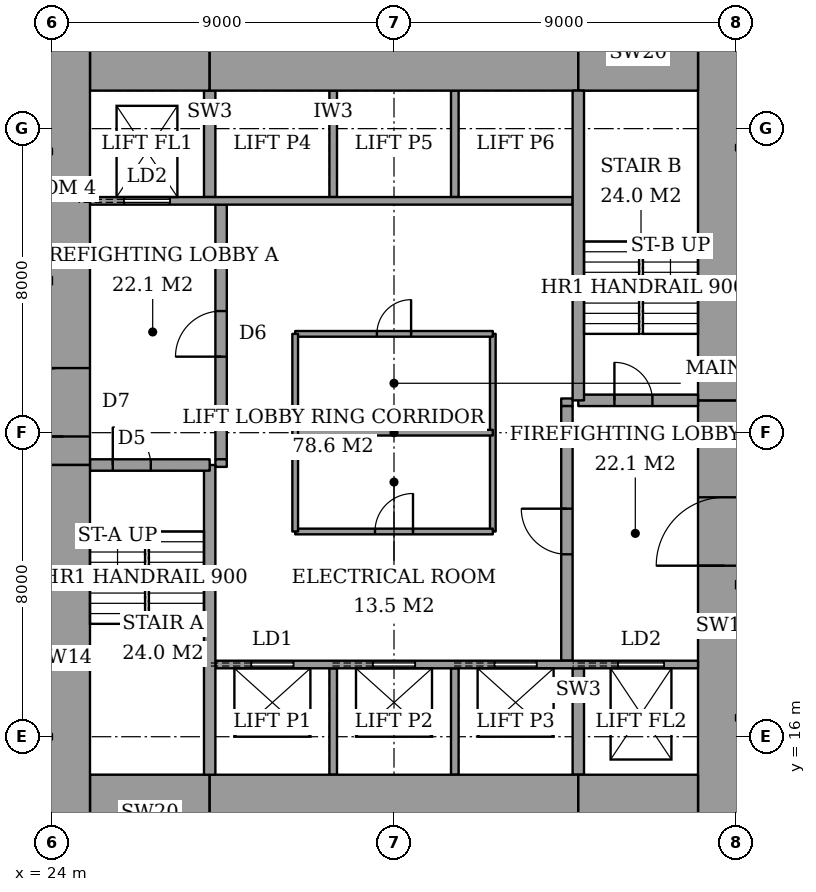
"""IFC4 building model, lengths in metres.
Left out: names, types, materials, properties, quantities, classifications, styles, units other than length and angle.
Written with IfcOpenShell. Run it as: python <this file> out.ifc"""

import sys

from ifc_helpers import new_model, si_unit, direction, frame, frame_2d, origin, place, context, subcontext, project, spatial, rectangle, extrude, element, fill, save


model = new_model("IFC4")
c1 = context("Model", 3, precision=1e-05, world=origin(), true_north=direction((0.0, 1.0)))
c2 = subcontext(c1, "Body", "Model", "MODEL_VIEW")
j1 = project(units=[si_unit("LENGTHUNIT", "METRE"), si_unit("PLANEANGLEUNIT", "RADIAN")], contexts=[c1])
p1 = place(None, origin())
s1 = spatial("IfcSite", under=j1, at=p1, CompositionType="ELEMENT")
p2 = place(p1, origin())
s2 = spatial("IfcBuilding", under=s1, at=p2, CompositionType="ELEMENT")
p3 = place(p2, frame((0.0, 0.0, 117.8)))
s3 = spatial("IfcBuildingStorey", under=s2, at=p3, CompositionType="ELEMENT", Elevation=117.8)
p4 = place(p3, frame((25.0, 14.0, 0.0), z_axis=(0.0, 0.0, 1.0), x_axis=(1.0, 0.0, 0.0)))
e1 = element("IfcWall", 1, at=p4, inside=s3, PredefinedType="SHEAR", context=c2, shape_type="SweptSolid", body=[
    extrude(rectangle(XDim=3.15, YDim=2.0, at=frame_2d((1.575, 0.0))), origin(), (0.0, 0.0, 1.0), 3.6),
])
p5 = place(p3, frame((28.15, 14.0, 0.0), z_axis=(0.0, 0.0, 1.0), x_axis=(1.0, 0.0, 0.0)))
e2 = element("IfcWall", 2, at=p5, inside=s3, PredefinedType="SHEAR", context=c2, shape_type="SweptSolid", body=[
    extrude(rectangle(XDim=9.7, YDim=2.0, at=frame_2d((4.85, 0.0))), origin(), (0.0, 0.0, 1.0), 3.6),
])
for number, where, z_axis, x_axis in (
    (3, (37.85, 14.0, 0.0), (0.0, 0.0, 1.0), (1.0, 0.0, 0.0)),
    (4, (25.0, 34.0, 0.0), (0.0, 0.0, 1.0), (1.0, 0.0, 0.0)),
):
    element("IfcWall", number, at=place(p3, frame(where, z_axis=z_axis, x_axis=x_axis)), inside=s3, PredefinedType="SHEAR", context=c2, shape_type="SweptSolid", body=[
        extrude(rectangle(XDim=3.15, YDim=2.0, at=frame_2d((1.575, 0.0))), origin(), (0.0, 0.0, 1.0), 3.6),
    ])
p6 = place(p3, frame((28.15, 34.0, 0.0), z_axis=(0.0, 0.0, 1.0), x_axis=(1.0, 0.0, 0.0)))
e5 = element("IfcWall", 5, at=p6, inside=s3, PredefinedType="SHEAR", context=c2, shape_type="SweptSolid", body=[
    extrude(rectangle(XDim=9.7, YDim=2.0, at=frame_2d((4.85, 0.0))), origin(), (0.0, 0.0, 1.0), 3.6),
])
p7 = place(p3, frame((37.85, 34.0, 0.0), z_axis=(0.0, 0.0, 1.0), x_axis=(1.0, 0.0, 0.0)))
e6 = element("IfcWall", 6, at=p7, inside=s3, PredefinedType="SHEAR", context=c2, shape_type="SweptSolid", body=[
    extrude(rectangle(XDim=3.15, YDim=2.0, at=frame_2d((1.575, 0.0))), origin(), (0.0, 0.0, 1.0), 3.6),
])
p8 = place(p3, frame((24.3, 13.0, 0.0), z_axis=(0.0, 0.0, 1.0), x_axis=(0.0, 1.0, 0.0)))
e7 = element("IfcWall", 7, at=p8, inside=s3, PredefinedType="SHEAR", context=c2, shape_type="SweptSolid", body=[
    extrude(rectangle(XDim=10.15, YDim=1.4, at=frame_2d((5.075, 0.0))), origin(), (0.0, 0.0, 1.0), 3.6),
])
p9 = place(p3, frame((24.3, 23.15, 0.0), z_axis=(0.0, 0.0, 1.0), x_axis=(0.0, 1.0, 0.0)))
e8 = element("IfcWall", 8, at=p9, inside=s3, PredefinedType="SHEAR", context=c2, shape_type="SweptSolid", body=[
    extrude(rectangle(XDim=11.85, YDim=1.4, at=frame_2d((5.925, 0.0))), origin(), (0.0, 0.0, 1.0), 3.6),
])
p10 = place(p9, frame((0.75, 0.0, 0.0)))
e9 = element("IfcOpeningElement", 9, at=p10, cuts=e8, PredefinedType="OPENING", context=c2, shape_type="SweptSolid", body=[
    extrude(rectangle(XDim=1.8, YDim=2.4, at=frame_2d((0.9, 1.2))), frame((0.0, 0.71, 0.0), z_axis=(0.0, -1.0, 0.0), x_axis=(1.0, 0.0, 0.0)), (0.0, 0.0, 1.0), 1.42),
])
p11 = place(p3, frame((41.7, 13.0, 0.0), z_axis=(0.0, 0.0, 1.0), x_axis=(0.0, 1.0, 0.0)))
e10 = element("IfcWall", 10, at=p11, inside=s3, PredefinedType="SHEAR", context=c2, shape_type="SweptSolid", body=[
    extrude(rectangle(XDim=11.85, YDim=1.4, at=frame_2d((5.925, 0.0))), origin(), (0.0, 0.0, 1.0), 3.6),
])
p12 = place(p11, frame((7.5, 0.0, 0.0)))
e11 = element("IfcOpeningElement", 11, at=p12, cuts=e10, PredefinedType="OPENING", context=c2, shape_type="SweptSolid", body=[
    extrude(rectangle(XDim=1.8, YDim=2.4, at=frame_2d((0.9, 1.2))), frame((0.0, 0.71, 0.0), z_axis=(0.0, -1.0, 0.0), x_axis=(1.0, 0.0, 0.0)), (0.0, 0.0, 1.0), 1.42),
])
p13 = place(p3, frame((41.7, 24.85, 0.0), z_axis=(0.0, 0.0, 1.0), x_axis=(0.0, 1.0, 0.0)))
e12 = element("IfcWall", 12, at=p13, inside=s3, PredefinedType="SHEAR", context=c2, shape_type="SweptSolid", body=[
    extrude(rectangle(XDim=10.15, YDim=1.4, at=frame_2d((5.075, 0.0))), origin(), (0.0, 0.0, 1.0), 3.6),
])
p14 = place(p3, frame((28.15, 15.0, 0.0), z_axis=(0.0, 0.0, 1.0), x_axis=(0.0, 1.0, 0.0)))
e13 = element("IfcWall", 13, at=p14, inside=s3, PredefinedType="SHEAR", context=c2, shape_type="SweptSolid", body=[
    extrude(rectangle(XDim=8.15, YDim=0.3, at=frame_2d((4.075, 0.0))), origin(), (0.0, 0.0, 1.0), 3.6),
])
p15 = place(p3, frame((25.0, 23.15, 0.0), z_axis=(0.0, 0.0, 1.0), x_axis=(1.0, 0.0, 0.0)))
e14 = element("IfcWall", 14, at=p15, inside=s3, PredefinedType="SHEAR", context=c2, shape_type="SweptSolid", body=[
    extrude(rectangle(XDim=3.15, YDim=0.3, at=frame_2d((1.575, 0.0))), origin(), (0.0, 0.0, 1.0), 3.6),
])
p16 = place(p15, frame((0.6, 0.0, 0.0)))
e15 = element("IfcOpeningElement", 15, at=p16, cuts=e14, PredefinedType="OPENING", context=c2, shape_type="SweptSolid", body=[
    extrude(rectangle(XDim=1.0, YDim=2.1, at=frame_2d((0.5, 1.05))), frame((0.0, 0.16, 0.0), z_axis=(0.0, -1.0, 0.0), x_axis=(1.0, 0.0, 0.0)), (0.0, 0.0, 1.0), 0.32),
])
p17 = place(p3, frame((37.85, 24.85, 0.0), z_axis=(0.0, 0.0, 1.0), x_axis=(0.0, 1.0, 0.0)))
e16 = element("IfcWall", 16, at=p17, inside=s3, PredefinedType="SHEAR", context=c2, shape_type="SweptSolid", body=[
    extrude(rectangle(XDim=8.15, YDim=0.3, at=frame_2d((4.075, 0.0))), origin(), (0.0, 0.0, 1.0), 3.6),
])
p18 = place(p3, frame((37.85, 24.85, 0.0), z_axis=(0.0, 0.0, 1.0), x_axis=(1.0, 0.0, 0.0)))
e17 = element("IfcWall", 17, at=p18, inside=s3, PredefinedType="SHEAR", context=c2, shape_type="SweptSolid", body=[
    extrude(rectangle(XDim=3.15, YDim=0.3, at=frame_2d((1.575, 0.0))), origin(), (0.0, 0.0, 1.0), 3.6),
])
p19 = place(p18, frame((0.95, 0.0, 0.0)))
e18 = element("IfcOpeningElement", 18, at=p19, cuts=e17, PredefinedType="OPENING", context=c2, shape_type="SweptSolid", body=[
    extrude(rectangle(XDim=1.0, YDim=2.1, at=frame_2d((0.5, 1.05))), frame((0.0, 0.16, 0.0), z_axis=(0.0, -1.0, 0.0), x_axis=(1.0, 0.0, 0.0)), (0.0, 0.0, 1.0), 0.32),
])
p20 = place(p3, frame((28.45, 23.3, 0.0), z_axis=(0.0, 0.0, 1.0), x_axis=(0.0, 1.0, 0.0)))
e19 = element("IfcWall", 19, at=p20, inside=s3, PredefinedType="PARTITIONING", context=c2, shape_type="SweptSolid", body=[
    extrude(rectangle(XDim=6.7, YDim=0.3, at=frame_2d((3.35, 0.0))), origin(), (0.0, 0.0, 1.0), 3.6),
])
p21 = place(p20, frame((2.7, 0.0, 0.0)))
e20 = element("IfcOpeningElement", 20, at=p21, cuts=e19, PredefinedType="OPENING", context=c2, shape_type="SweptSolid", body=[
    extrude(rectangle(XDim=1.2, YDim=2.1, at=frame_2d((0.6, 1.05))), frame((0.0, 0.16, 0.0), z_axis=(0.0, -1.0, 0.0), x_axis=(1.0, 0.0, 0.0)), (0.0, 0.0, 1.0), 0.32),
])
p22 = place(p3, frame((37.55, 18.0, 0.0), z_axis=(0.0, 0.0, 1.0), x_axis=(0.0, 1.0, 0.0)))
e21 = element("IfcWall", 21, at=p22, inside=s3, PredefinedType="PARTITIONING", context=c2, shape_type="SweptSolid", body=[
    extrude(rectangle(XDim=6.7, YDim=0.3, at=frame_2d((3.35, 0.0))), origin(), (0.0, 0.0, 1.0), 3.6),
])
p23 = place(p22, frame((2.8, 0.0, 0.0)))
e22 = element("IfcOpeningElement", 22, at=p23, cuts=e21, PredefinedType="OPENING", context=c2, shape_type="SweptSolid", body=[
    extrude(rectangle(XDim=1.2, YDim=2.1, at=frame_2d((0.6, 1.05))), frame((0.0, 0.16, 0.0), z_axis=(0.0, -1.0, 0.0), x_axis=(1.0, 0.0, 0.0)), (0.0, 0.0, 1.0), 0.32),
])
p24 = place(p3, frame((28.3, 17.9, 0.0), z_axis=(0.0, 0.0, 1.0), x_axis=(1.0, 0.0, 0.0)))
e23 = element("IfcWall", 23, at=p24, inside=s3, PredefinedType="PARTITIONING", context=c2, shape_type="SweptSolid", body=[
    extrude(rectangle(XDim=12.7, YDim=0.2, at=frame_2d((6.35, 0.0))), origin(), (0.0, 0.0, 1.0), 3.6),
])
p25 = place(p24, frame((0.95, 0.0, 0.0)))
e24 = element("IfcOpeningElement", 24, at=p25, cuts=e23, PredefinedType="OPENING", context=c2, shape_type="SweptSolid", body=[
    extrude(rectangle(XDim=1.1, YDim=2.1, at=frame_2d((0.55, 1.05))), frame((0.0, 0.11, 0.0), z_axis=(0.0, -1.0, 0.0), x_axis=(1.0, 0.0, 0.0)), (0.0, 0.0, 1.0), 0.22),
])
p26 = place(p24, frame((4.15, 0.0, 0.0)))
e25 = element("IfcOpeningElement", 25, at=p26, cuts=e23, PredefinedType="OPENING", context=c2, shape_type="SweptSolid", body=[
    extrude(rectangle(XDim=1.1, YDim=2.1, at=frame_2d((0.55, 1.05))), frame((0.0, 0.11, 0.0), z_axis=(0.0, -1.0, 0.0), x_axis=(1.0, 0.0, 0.0)), (0.0, 0.0, 1.0), 0.22),
])
p27 = place(p24, frame((7.35, 0.0, 0.0)))
e26 = element("IfcOpeningElement", 26, at=p27, cuts=e23, PredefinedType="OPENING", context=c2, shape_type="SweptSolid", body=[
    extrude(rectangle(XDim=1.1, YDim=2.1, at=frame_2d((0.55, 1.05))), frame((0.0, 0.11, 0.0), z_axis=(0.0, -1.0, 0.0), x_axis=(1.0, 0.0, 0.0)), (0.0, 0.0, 1.0), 0.22),
])
p28 = place(p24, frame((10.6, 0.0, 0.0)))
e27 = element("IfcOpeningElement", 27, at=p28, cuts=e23, PredefinedType="OPENING", context=c2, shape_type="SweptSolid", body=[
    extrude(rectangle(XDim=1.2, YDim=2.1, at=frame_2d((0.6, 1.05))), frame((0.0, 0.11, 0.0), z_axis=(0.0, -1.0, 0.0), x_axis=(1.0, 0.0, 0.0)), (0.0, 0.0, 1.0), 0.22),
])
p29 = place(p3, frame((25.0, 30.1, 0.0), z_axis=(0.0, 0.0, 1.0), x_axis=(1.0, 0.0, 0.0)))
e28 = element("IfcWall", 28, at=p29, inside=s3, PredefinedType="PARTITIONING", context=c2, shape_type="SweptSolid", body=[
    extrude(rectangle(XDim=12.7, YDim=0.2, at=frame_2d((6.35, 0.0))), origin(), (0.0, 0.0, 1.0), 3.6),
])
p30 = place(p29, frame((0.9, 0.0, 0.0)))
e29 = element("IfcOpeningElement", 29, at=p30, cuts=e28, PredefinedType="OPENING", context=c2, shape_type="SweptSolid", body=[
    extrude(rectangle(XDim=1.2, YDim=2.1, at=frame_2d((0.6, 1.05))), frame((0.0, 0.11, 0.0), z_axis=(0.0, -1.0, 0.0), x_axis=(1.0, 0.0, 0.0)), (0.0, 0.0, 1.0), 0.22),
])
for number, where, z_axis, x_axis in (
    (30, (31.4, 15.0, 0.0), (0.0, 0.0, 1.0), (0.0, 1.0, 0.0)),
    (31, (34.6, 15.0, 0.0), (0.0, 0.0, 1.0), (0.0, 1.0, 0.0)),
):
    element("IfcWall", number, at=place(p3, frame(where, z_axis=z_axis, x_axis=x_axis)), inside=s3, PredefinedType="PARTITIONING", context=c2, shape_type="SweptSolid", body=[
        extrude(rectangle(XDim=2.8, YDim=0.2, at=frame_2d((1.4, 0.0))), origin(), (0.0, 0.0, 1.0), 3.6),
    ])
p31 = place(p3, frame((37.85, 15.0, 0.0), z_axis=(0.0, 0.0, 1.0), x_axis=(0.0, 1.0, 0.0)))
e32 = element("IfcWall", 32, at=p31, inside=s3, PredefinedType="SHEAR", context=c2, shape_type="SweptSolid", body=[
    extrude(rectangle(XDim=2.8, YDim=0.3, at=frame_2d((1.4, 0.0))), origin(), (0.0, 0.0, 1.0), 3.6),
])
for number, where, z_axis, x_axis in (
    (33, (31.4, 30.2, 0.0), (0.0, 0.0, 1.0), (0.0, 1.0, 0.0)),
    (34, (34.6, 30.2, 0.0), (0.0, 0.0, 1.0), (0.0, 1.0, 0.0)),
):
    element("IfcWall", number, at=place(p3, frame(where, z_axis=z_axis, x_axis=x_axis)), inside=s3, PredefinedType="PARTITIONING", context=c2, shape_type="SweptSolid", body=[
        extrude(rectangle(XDim=2.8, YDim=0.2, at=frame_2d((1.4, 0.0))), origin(), (0.0, 0.0, 1.0), 3.6),
    ])
p32 = place(p3, frame((28.15, 30.2, 0.0), z_axis=(0.0, 0.0, 1.0), x_axis=(0.0, 1.0, 0.0)))
e35 = element("IfcWall", 35, at=p32, inside=s3, PredefinedType="SHEAR", context=c2, shape_type="SweptSolid", body=[
    extrude(rectangle(XDim=2.8, YDim=0.3, at=frame_2d((1.4, 0.0))), origin(), (0.0, 0.0, 1.0), 3.6),
])
for number, where, z_axis, x_axis in (
    (36, (28.3, 23.2, 0.0), (0.0, 0.0, 1.0), (1.0, 0.0, 0.0)),
    (37, (37.4, 24.8, 0.0), (0.0, 0.0, 1.0), (1.0, 0.0, 0.0)),
):
    element("IfcWall", number, at=place(p3, frame(where, z_axis=z_axis, x_axis=x_axis)), inside=s3, PredefinedType="PARTITIONING", context=c2, shape_type="SweptSolid", body=[
        extrude(rectangle(XDim=0.3, YDim=0.2, at=frame_2d((0.15, 0.0))), origin(), (0.0, 0.0, 1.0), 3.6),
    ])
p33 = place(p3, frame((30.4, 21.4, 0.0), z_axis=(0.0, 0.0, 1.0), x_axis=(1.0, 0.0, 0.0)))
e38 = element("IfcWall", 38, at=p33, inside=s3, PredefinedType="PARTITIONING", context=c2, shape_type="SweptSolid", body=[
    extrude(rectangle(XDim=5.2, YDim=0.15, at=frame_2d((2.6, 0.0))), origin(), (0.0, 0.0, 1.0), 3.35),
])
p34 = place(p33, frame((2.1, 0.0, 0.0)))
e39 = element("IfcOpeningElement", 39, at=p34, cuts=e38, PredefinedType="OPENING", context=c2, shape_type="SweptSolid", body=[
    extrude(rectangle(XDim=1.0, YDim=2.1, at=frame_2d((0.5, 1.05))), frame((0.0, 0.085, 0.0), z_axis=(0.0, -1.0, 0.0), x_axis=(1.0, 0.0, 0.0)), (0.0, 0.0, 1.0), 0.17),
])
p35 = place(p3, frame((30.4, 26.6, 0.0), z_axis=(0.0, 0.0, 1.0), x_axis=(1.0, 0.0, 0.0)))
e40 = element("IfcWall", 40, at=p35, inside=s3, PredefinedType="PARTITIONING", context=c2, shape_type="SweptSolid", body=[
    extrude(rectangle(XDim=5.2, YDim=0.15, at=frame_2d((2.6, 0.0))), origin(), (0.0, 0.0, 1.0), 3.35),
])
p36 = place(p35, frame((2.15, 0.0, 0.0)))
e41 = element("IfcOpeningElement", 41, at=p36, cuts=e40, PredefinedType="OPENING", context=c2, shape_type="SweptSolid", body=[
    extrude(rectangle(XDim=0.9, YDim=2.1, at=frame_2d((0.45, 1.05))), frame((0.0, 0.085, 0.0), z_axis=(0.0, -1.0, 0.0), x_axis=(1.0, 0.0, 0.0)), (0.0, 0.0, 1.0), 0.17),
])
for number, where, z_axis, x_axis in (
    (42, (30.4, 21.4, 0.0), (0.0, 0.0, 1.0), (0.0, 1.0, 0.0)),
    (43, (35.6, 21.4, 0.0), (0.0, 0.0, 1.0), (0.0, 1.0, 0.0)),
    (44, (30.4, 24.0, 0.0), (0.0, 0.0, 1.0), (1.0, 0.0, 0.0)),
):
    element("IfcWall", number, at=place(p3, frame(where, z_axis=z_axis, x_axis=x_axis)), inside=s3, PredefinedType="PARTITIONING", context=c2, shape_type="SweptSolid", body=[
        extrude(rectangle(XDim=5.2, YDim=0.15, at=frame_2d((2.6, 0.0))), origin(), (0.0, 0.0, 1.0), 3.35),
    ])
p37 = place(p16, origin())
e45 = element("IfcDoor", 45, at=p37, inside=s3, OperationType="SINGLE_SWING_RIGHT", PredefinedType="DOOR", context=c2, shape_type="SweptSolid", body=[
    extrude(rectangle(XDim=1.0, YDim=2.1, at=frame_2d((0.5, 1.05))), frame((0.0, 0.025, 0.0), z_axis=(0.0, -1.0, 0.0), x_axis=(1.0, 0.0, 0.0)), (0.0, 0.0, 1.0), 0.05),
])
fill(e15, e45)
p38 = place(p19, origin())
e46 = element("IfcDoor", 46, at=p38, inside=s3, OperationType="SINGLE_SWING_RIGHT", PredefinedType="DOOR", context=c2, shape_type="SweptSolid", body=[
    extrude(rectangle(XDim=1.0, YDim=2.1, at=frame_2d((0.5, 1.05))), frame((0.0, 0.025, 0.0), z_axis=(0.0, -1.0, 0.0), x_axis=(1.0, 0.0, 0.0)), (0.0, 0.0, 1.0), 0.05),
])
fill(e18, e46)
p39 = place(p21, origin())
e47 = element("IfcDoor", 47, at=p39, inside=s3, OperationType="SINGLE_SWING_RIGHT", PredefinedType="DOOR", context=c2, shape_type="SweptSolid", body=[
    extrude(rectangle(XDim=1.2, YDim=2.1, at=frame_2d((0.6, 1.05))), frame((0.0, 0.025, 0.0), z_axis=(0.0, -1.0, 0.0), x_axis=(1.0, 0.0, 0.0)), (0.0, 0.0, 1.0), 0.05),
])
fill(e20, e47)
p40 = place(p23, origin())
e48 = element("IfcDoor", 48, at=p40, inside=s3, OperationType="SINGLE_SWING_LEFT", PredefinedType="DOOR", context=c2, shape_type="SweptSolid", body=[
    extrude(rectangle(XDim=1.2, YDim=2.1, at=frame_2d((0.6, 1.05))), frame((0.0, 0.025, 0.0), z_axis=(0.0, -1.0, 0.0), x_axis=(1.0, 0.0, 0.0)), (0.0, 0.0, 1.0), 0.05),
])
fill(e22, e48)
p41 = place(p10, origin())
e49 = element("IfcDoor", 49, at=p41, inside=s3, OperationType="DOUBLE_DOOR_DOUBLE_SWING", PredefinedType="DOOR", context=c2, shape_type="SweptSolid", body=[
    extrude(rectangle(XDim=1.8, YDim=2.4, at=frame_2d((0.9, 1.2))), frame((0.0, 0.025, 0.0), z_axis=(0.0, -1.0, 0.0), x_axis=(1.0, 0.0, 0.0)), (0.0, 0.0, 1.0), 0.05),
])
fill(e9, e49)
p42 = place(p12, origin())
e50 = element("IfcDoor", 50, at=p42, inside=s3, OperationType="DOUBLE_DOOR_DOUBLE_SWING", PredefinedType="DOOR", context=c2, shape_type="SweptSolid", body=[
    extrude(rectangle(XDim=1.8, YDim=2.4, at=frame_2d((0.9, 1.2))), frame((0.0, 0.025, 0.0), z_axis=(0.0, -1.0, 0.0), x_axis=(1.0, 0.0, 0.0)), (0.0, 0.0, 1.0), 0.05),
])
fill(e11, e50)
p43 = place(p34, origin())
e51 = element("IfcDoor", 51, at=p43, inside=s3, OperationType="SINGLE_SWING_LEFT", PredefinedType="DOOR", context=c2, shape_type="SweptSolid", body=[
    extrude(rectangle(XDim=1.0, YDim=2.1, at=frame_2d((0.5, 1.05))), frame((0.0, 0.025, 0.0), z_axis=(0.0, -1.0, 0.0), x_axis=(1.0, 0.0, 0.0)), (0.0, 0.0, 1.0), 0.05),
])
fill(e39, e51)
p44 = place(p36, origin())
e52 = element("IfcDoor", 52, at=p44, inside=s3, OperationType="SINGLE_SWING_LEFT", PredefinedType="DOOR", context=c2, shape_type="SweptSolid", body=[
    extrude(rectangle(XDim=0.9, YDim=2.1, at=frame_2d((0.45, 1.05))), frame((0.0, 0.025, 0.0), z_axis=(0.0, -1.0, 0.0), x_axis=(1.0, 0.0, 0.0)), (0.0, 0.0, 1.0), 0.05),
])
fill(e41, e52)
p45 = place(p25, origin())
e53 = element("IfcDoor", 53, at=p45, inside=s3, OperationType="SLIDING_TO_LEFT", PredefinedType="DOOR", context=c2, shape_type="SweptSolid", body=[
    extrude(rectangle(XDim=1.1, YDim=2.1, at=frame_2d((0.55, 1.05))), frame((0.0, 0.025, 0.0), z_axis=(0.0, -1.0, 0.0), x_axis=(1.0, 0.0, 0.0)), (0.0, 0.0, 1.0), 0.05),
])
fill(e24, e53)
p46 = place(p26, origin())
e54 = element("IfcDoor", 54, at=p46, inside=s3, OperationType="SLIDING_TO_LEFT", PredefinedType="DOOR", context=c2, shape_type="SweptSolid", body=[
    extrude(rectangle(XDim=1.1, YDim=2.1, at=frame_2d((0.55, 1.05))), frame((0.0, 0.025, 0.0), z_axis=(0.0, -1.0, 0.0), x_axis=(1.0, 0.0, 0.0)), (0.0, 0.0, 1.0), 0.05),
])
fill(e25, e54)
p47 = place(p27, origin())
e55 = element("IfcDoor", 55, at=p47, inside=s3, OperationType="SLIDING_TO_LEFT", PredefinedType="DOOR", context=c2, shape_type="SweptSolid", body=[
    extrude(rectangle(XDim=1.1, YDim=2.1, at=frame_2d((0.55, 1.05))), frame((0.0, 0.025, 0.0), z_axis=(0.0, -1.0, 0.0), x_axis=(1.0, 0.0, 0.0)), (0.0, 0.0, 1.0), 0.05),
])
fill(e26, e55)
p48 = place(p30, origin())
e56 = element("IfcDoor", 56, at=p48, inside=s3, OperationType="SLIDING_TO_LEFT", PredefinedType="DOOR", context=c2, shape_type="SweptSolid", body=[
    extrude(rectangle(XDim=1.2, YDim=2.1, at=frame_2d((0.6, 1.05))), frame((0.0, 0.025, 0.0), z_axis=(0.0, -1.0, 0.0), x_axis=(1.0, 0.0, 0.0)), (0.0, 0.0, 1.0), 0.05),
])
fill(e29, e56)
p49 = place(p28, origin())
e57 = element("IfcDoor", 57, at=p49, inside=s3, OperationType="SLIDING_TO_LEFT", PredefinedType="DOOR", context=c2, shape_type="SweptSolid", body=[
    extrude(rectangle(XDim=1.2, YDim=2.1, at=frame_2d((0.6, 1.05))), frame((0.0, 0.025, 0.0), z_axis=(0.0, -1.0, 0.0), x_axis=(1.0, 0.0, 0.0)), (0.0, 0.0, 1.0), 0.05),
])
fill(e27, e57)
save(model, sys.argv[1])
